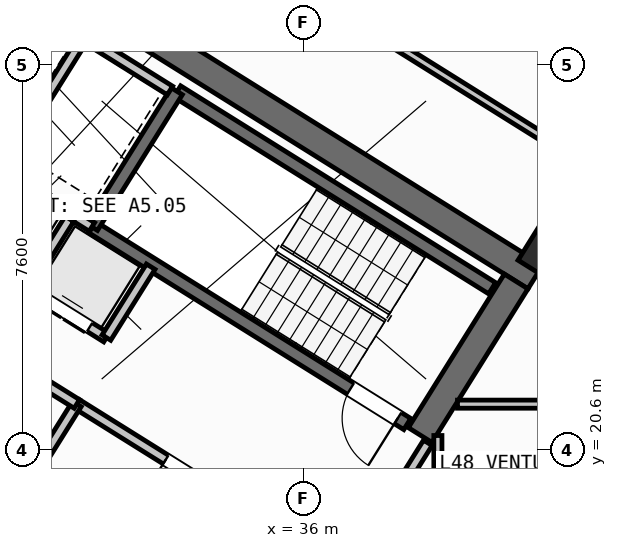
"""IFC4 building model, lengths in metres.
Left out: names, types, materials, properties, quantities, classifications, styles, units other than length and angle.
Written with IfcOpenShell. Run it as: python <this file> out.ifc"""

import sys

from ifc_helpers import new_model, si_unit, direction, frame, frame_2d, origin, origin_2d, place, context, subcontext, project, spatial, rectangle, hollow_rectangle, extrude, source, transform, mapped, element, fill, save


model = new_model("IFC4")
c1 = context("Model", 3, precision=1e-05, world=origin(), true_north=direction((0.0, 1.0)))
c2 = subcontext(c1, "Body", "Model", "MODEL_VIEW")
j1 = project(units=[si_unit("LENGTHUNIT", "METRE"), si_unit("PLANEANGLEUNIT", "RADIAN")], contexts=[c1])
p1 = place(None, origin())
s1 = spatial("IfcSite", under=j1, at=p1, CompositionType="ELEMENT")
p2 = place(p1, origin())
s2 = spatial("IfcBuilding", under=s1, at=p2, CompositionType="ELEMENT")
p3 = place(p2, frame((0.0, 0.0, 191.4)))
s3 = spatial("IfcBuildingStorey", under=s2, at=p3, CompositionType="ELEMENT", Elevation=191.4)
p4 = place(p3, frame((40.573, 24.01, 0.0), z_axis=(0.0, 0.0, 1.0), x_axis=(-0.848047359947, 0.529920442413, 0.0)))
e1 = element("IfcWall", 1, at=p4, inside=s3, PredefinedType="SHEAR", context=c2, shape_type="SweptSolid", body=[
    extrude(rectangle(XDim=13.14, YDim=0.55, at=frame_2d((6.57, 0.0))), origin(), (0.0, 0.0, 1.0), 3.32),
])
p5 = place(p3, frame((40.194, 23.922, 0.0), z_axis=(0.0, 0.0, 1.0), x_axis=(-0.529888438328, -0.848067357541, 0.0)))
e2 = element("IfcWall", 2, at=p5, inside=s3, PredefinedType="SHEAR", context=c2, shape_type="SweptSolid", body=[
    extrude(rectangle(XDim=3.575, YDim=0.55, at=frame_2d((1.788, 0.0))), origin(), (0.0, 0.0, 1.0), 3.32),
])
m1 = source(origin(), c2, "Body", "SweptSolid", [
    extrude(hollow_rectangle(XDim=0.8, YDim=0.8, WallThickness=0.032, at=origin_2d()), origin(), (0.0, 0.0, 1.0), 3.6),
])
p6 = place(p3, frame((40.783, 24.469, 0.0), z_axis=(0.0, 0.0, 1.0), x_axis=(-0.848048096156, 0.529919264233, 0.0)))
e3 = element("IfcColumn", 3, at=p6, inside=s3, PredefinedType="COLUMN", context=c2, shape_type="MappedRepresentation", body=[
    mapped(m1, transform((0.0, 0.0, 0.0), scale=1.0)),
])
p7 = place(p3, frame((31.76, 12.183, 0.0), z_axis=(0.0, 0.0, 1.0), x_axis=(-0.848047074256, 0.529920899612, 0.0)))
e4 = element("IfcWall", 4, at=p7, inside=s3, PredefinedType="STANDARD", context=c2, shape_type="SweptSolid", body=[
    extrude(rectangle(XDim=30.652, YDim=0.32, at=frame_2d((15.326, 0.0))), origin(), (0.0, 0.0, 1.0), 3.32),
])
p8 = place(p7, frame((15.166, 0.0, 0.0)))
e5 = element("IfcOpeningElement", 5, at=p8, cuts=e4, PredefinedType="OPENING", context=c2, shape_type="SweptSolid", body=[
    extrude(rectangle(XDim=1.2, YDim=2.15, at=frame_2d((0.6, 1.075))), frame((0.0, 0.17, 0.0), z_axis=(0.0, -1.0, 0.0), x_axis=(1.0, 0.0, 0.0)), (0.0, 0.0, 1.0), 0.34),
])
p9 = place(p7, frame((2.015, 0.0, 0.8)))
e6 = element("IfcOpeningElement", 6, at=p9, cuts=e4, PredefinedType="OPENING", context=c2, shape_type="SweptSolid", body=[
    extrude(rectangle(XDim=2.1, YDim=1.55, at=frame_2d((1.05, 0.775))), frame((0.0, 0.17, 0.0), z_axis=(0.0, -1.0, 0.0), x_axis=(1.0, 0.0, 0.0)), (0.0, 0.0, 1.0), 0.34),
])
p10 = place(p7, frame((7.244, 0.0, 0.8)))
e7 = element("IfcOpeningElement", 7, at=p10, cuts=e4, PredefinedType="OPENING", context=c2, shape_type="SweptSolid", body=[
    extrude(rectangle(XDim=2.1, YDim=1.55, at=frame_2d((1.05, 0.775))), frame((0.0, 0.17, 0.0), z_axis=(0.0, -1.0, 0.0), x_axis=(1.0, 0.0, 0.0)), (0.0, 0.0, 1.0), 0.34),
])
p11 = place(p7, frame((12.623, 0.0, 1.0)))
e8 = element("IfcOpeningElement", 8, at=p11, cuts=e4, PredefinedType="OPENING", context=c2, shape_type="SweptSolid", body=[
    extrude(rectangle(XDim=0.9, YDim=1.25, at=frame_2d((0.45, 0.625))), frame((0.0, 0.17, 0.0), z_axis=(0.0, -1.0, 0.0), x_axis=(1.0, 0.0, 0.0)), (0.0, 0.0, 1.0), 0.34),
])
p12 = place(p7, frame((19.565, 0.0, 0.95)))
e9 = element("IfcOpeningElement", 9, at=p12, cuts=e4, PredefinedType="OPENING", context=c2, shape_type="SweptSolid", body=[
    extrude(rectangle(XDim=1.2, YDim=1.4, at=frame_2d((0.6, 0.7))), frame((0.0, 0.17, 0.0), z_axis=(0.0, -1.0, 0.0), x_axis=(1.0, 0.0, 0.0)), (0.0, 0.0, 1.0), 0.34),
])
p13 = place(p7, frame((25.983, 0.0, 1.0)))
e10 = element("IfcOpeningElement", 10, at=p13, cuts=e4, PredefinedType="OPENING", context=c2, shape_type="SweptSolid", body=[
    extrude(rectangle(XDim=0.9, YDim=1.25, at=frame_2d((0.45, 0.625))), frame((0.0, 0.17, 0.0), z_axis=(0.0, -1.0, 0.0), x_axis=(1.0, 0.0, 0.0)), (0.0, 0.0, 1.0), 0.34),
])
p14 = place(p7, frame((28.433, 0.0, 1.0)))
e11 = element("IfcOpeningElement", 11, at=p14, cuts=e4, PredefinedType="OPENING", context=c2, shape_type="SweptSolid", body=[
    extrude(rectangle(XDim=0.9, YDim=1.25, at=frame_2d((0.45, 0.625))), frame((0.0, 0.17, 0.0), z_axis=(0.0, -1.0, 0.0), x_axis=(1.0, 0.0, 0.0)), (0.0, 0.0, 1.0), 0.34),
])
p15 = place(p3, frame((31.28, 18.261, 0.0), z_axis=(0.0, 0.0, 1.0), x_axis=(-0.848051618787, 0.529913626805, 0.0)))
e12 = element("IfcWall", 12, at=p15, inside=s3, PredefinedType="SHEAR", context=c2, shape_type="SweptSolid", body=[
    extrude(rectangle(XDim=7.46, YDim=0.26, at=frame_2d((3.73, 0.0))), origin(), (0.0, 0.0, 1.0), 3.32),
])
p16 = place(p15, frame((0.36, 0.0, 0.0)))
e13 = element("IfcOpeningElement", 13, at=p16, cuts=e12, PredefinedType="OPENING", context=c2, shape_type="SweptSolid", body=[
    extrude(rectangle(XDim=0.86, YDim=2.05, at=frame_2d((0.43, 1.025))), frame((0.0, 0.14, 0.0), z_axis=(0.0, -1.0, 0.0), x_axis=(1.0, 0.0, 0.0)), (0.0, 0.0, 1.0), 0.28),
])
p17 = place(p3, frame((39.721, 23.788, 0.0), z_axis=(0.0, 0.0, 1.0), x_axis=(-0.848054434086, 0.529909121291, 0.0)))
e14 = element("IfcWall", 14, at=p17, inside=s3, PredefinedType="SHEAR", context=c2, shape_type="SweptSolid", body=[
    extrude(rectangle(XDim=7.33, YDim=0.26, at=frame_2d((3.665, 0.0))), origin(), (0.0, 0.0, 1.0), 3.32),
])
p18 = place(p3, frame((38.046, 21.108, 0.0), z_axis=(0.0, 0.0, 1.0), x_axis=(-0.848054434086, 0.529909121291, 0.0)))
e15 = element("IfcWall", 15, at=p18, inside=s3, PredefinedType="SHEAR", context=c2, shape_type="SweptSolid", body=[
    extrude(rectangle(XDim=7.33, YDim=0.26, at=frame_2d((3.665, 0.0))), origin(), (0.0, 0.0, 1.0), 3.32),
])
p19 = place(p18, frame((0.22, 0.0, 0.0)))
e16 = element("IfcOpeningElement", 16, at=p19, cuts=e15, PredefinedType="OPENING", context=c2, shape_type="SweptSolid", body=[
    extrude(rectangle(XDim=1.1, YDim=2.1, at=frame_2d((0.55, 1.05))), frame((0.0, 0.14, 0.0), z_axis=(0.0, -1.0, 0.0), x_axis=(1.0, 0.0, 0.0)), (0.0, 0.0, 1.0), 0.28),
])
p20 = place(p3, frame((33.496, 27.677, 0.0), z_axis=(0.0, 0.0, 1.0), x_axis=(-0.529908658664, -0.84805472316, 0.0)))
e17 = element("IfcWall", 17, at=p20, inside=s3, PredefinedType="SHEAR", context=c2, shape_type="SweptSolid", body=[
    extrude(rectangle(XDim=3.16, YDim=0.26, at=frame_2d((1.58, 0.0))), origin(), (0.0, 0.0, 1.0), 3.32),
])
p21 = place(p3, frame((36.417, 18.447, 0.0), z_axis=(0.0, 0.0, 1.0), x_axis=(-0.848064879198, 0.529892404805, 0.0)))
e18 = element("IfcWall", 18, at=p21, inside=s3, PredefinedType="STANDARD", context=c2, shape_type="SweptSolid", body=[
    extrude(rectangle(XDim=5.768, YDim=0.2, at=frame_2d((2.884, 0.0))), origin(), (0.0, 0.0, 1.0), 3.31),
])
p22 = place(p21, frame((2.548, 0.0, 0.0)))
e19 = element("IfcOpeningElement", 19, at=p22, cuts=e18, PredefinedType="OPENING", context=c2, shape_type="SweptSolid", body=[
    extrude(rectangle(XDim=1.15, YDim=2.1, at=frame_2d((0.575, 1.05))), frame((0.0, 0.11, 0.0), z_axis=(0.0, -1.0, 0.0), x_axis=(1.0, 0.0, 0.0)), (0.0, 0.0, 1.0), 0.22),
])
p23 = place(p3, frame((31.822, 24.998, 0.0), z_axis=(0.0, 0.0, 1.0), x_axis=(-0.848036912365, 0.52993716162, 0.0)))
e20 = element("IfcWall", 20, at=p23, inside=s3, PredefinedType="STANDARD", context=c2, shape_type="SweptSolid", body=[
    extrude(rectangle(XDim=4.618, YDim=0.2, at=frame_2d((2.309, 0.0))), origin(), (0.0, 0.0, 1.0), 3.31),
])
p24 = place(p3, frame((32.108, 22.814, 0.0), z_axis=(0.0, 0.0, 1.0), x_axis=(-0.848042229521, 0.529928652696, 0.0)))
e21 = element("IfcWall", 21, at=p24, inside=s3, PredefinedType="STANDARD", context=c2, shape_type="SweptSolid", body=[
    extrude(rectangle(XDim=5.62, YDim=0.2, at=frame_2d((2.81, 0.0))), origin(), (0.0, 0.0, 1.0), 3.31),
])
p25 = place(p24, frame((0.39, 0.0, 0.0)))
e22 = element("IfcOpeningElement", 22, at=p25, cuts=e21, PredefinedType="OPENING", context=c2, shape_type="SweptSolid", body=[
    extrude(rectangle(XDim=1.1, YDim=2.15, at=frame_2d((0.55, 1.075))), frame((0.0, 0.11, 0.0), z_axis=(0.0, -1.0, 0.0), x_axis=(1.0, 0.0, 0.0)), (0.0, 0.0, 1.0), 0.22),
])
p26 = place(p24, frame((2.25, 0.0, 0.0)))
e23 = element("IfcOpeningElement", 23, at=p26, cuts=e21, PredefinedType="OPENING", context=c2, shape_type="SweptSolid", body=[
    extrude(rectangle(XDim=1.1, YDim=2.15, at=frame_2d((0.55, 1.075))), frame((0.0, 0.11, 0.0), z_axis=(0.0, -1.0, 0.0), x_axis=(1.0, 0.0, 0.0)), (0.0, 0.0, 1.0), 0.22),
])
p27 = place(p24, frame((4.11, 0.0, 0.0)))
e24 = element("IfcOpeningElement", 24, at=p27, cuts=e21, PredefinedType="OPENING", context=c2, shape_type="SweptSolid", body=[
    extrude(rectangle(XDim=1.1, YDim=2.15, at=frame_2d((0.55, 1.075))), frame((0.0, 0.11, 0.0), z_axis=(0.0, -1.0, 0.0), x_axis=(1.0, 0.0, 0.0)), (0.0, 0.0, 1.0), 0.22),
])
p28 = place(p3, frame((32.982, 24.213, 0.0), z_axis=(0.0, 0.0, 1.0), x_axis=(-0.529839334948, -0.84809803628, 0.0)))
e25 = element("IfcWall", 25, at=p28, inside=s3, PredefinedType="STANDARD", context=c2, shape_type="SweptSolid", body=[
    extrude(rectangle(XDim=1.65, YDim=0.2, at=frame_2d((0.825, 0.0))), origin(), (0.0, 0.0, 1.0), 3.31),
])
p29 = place(p3, frame((31.645, 28.716, 0.0), z_axis=(0.0, 0.0, 1.0), x_axis=(-0.52986693015, -0.848080795876, 0.0)))
e26 = element("IfcWall", 26, at=p29, inside=s3, PredefinedType="STANDARD", context=c2, shape_type="SweptSolid", body=[
    extrude(rectangle(XDim=2.66, YDim=0.2, at=frame_2d((1.33, 0.0))), origin(), (0.0, 0.0, 1.0), 3.31),
])
p30 = place(p3, frame((33.363, 27.69, 0.0), z_axis=(0.0, 0.0, 1.0), x_axis=(-0.848047090064, 0.529920874315, 0.0)))
e27 = element("IfcWall", 27, at=p30, inside=s3, PredefinedType="STANDARD", context=c2, shape_type="SweptSolid", body=[
    extrude(rectangle(XDim=4.498, YDim=0.2, at=frame_2d((2.249, 0.0))), origin(), (0.0, 0.0, 1.0), 3.31),
])
p31 = place(p3, frame((31.379, 25.156, 0.0), z_axis=(0.0, 0.0, 1.0), x_axis=(-0.529998940003, -0.847998304005, 0.0)))
e28 = element("IfcWall", 28, at=p31, inside=s3, PredefinedType="STANDARD", context=c2, shape_type="SweptSolid", body=[
    extrude(rectangle(XDim=1.58, YDim=0.2, at=frame_2d((0.79, 0.0))), origin(), (0.0, 0.0, 1.0), 3.31),
])
p32 = place(p3, frame((31.525, 21.504, 0.0), z_axis=(0.0, 0.0, 1.0), x_axis=(-0.529907497854, -0.848055448493, 0.0)))
e29 = element("IfcWall", 29, at=p32, inside=s3, PredefinedType="STANDARD", context=c2, shape_type="SweptSolid", body=[
    extrude(rectangle(XDim=2.88, YDim=0.2, at=frame_2d((1.44, 0.0))), origin(), (0.0, 0.0, 1.0), 3.31),
])
p33 = place(p3, frame((31.525, 21.504, 0.0), z_axis=(0.0, 0.0, 1.0), x_axis=(-0.848040211232, 0.529931882541, 0.0)))
e30 = element("IfcWall", 30, at=p33, inside=s3, PredefinedType="STANDARD", context=c2, shape_type="SweptSolid", body=[
    extrude(rectangle(XDim=6.218, YDim=0.2, at=frame_2d((3.109, 0.0))), origin(), (0.0, 0.0, 1.0), 3.31),
])
p34 = place(p33, frame((4.4, 0.0, 0.0)))
e31 = element("IfcOpeningElement", 31, at=p34, cuts=e30, PredefinedType="OPENING", context=c2, shape_type="SweptSolid", body=[
    extrude(rectangle(XDim=0.86, YDim=2.05, at=frame_2d((0.43, 1.025))), frame((0.0, 0.11, 0.0), z_axis=(0.0, -1.0, 0.0), x_axis=(1.0, 0.0, 0.0)), (0.0, 0.0, 1.0), 0.22),
])
p35 = place(p33, frame((1.45, 0.0, 0.0)))
e32 = element("IfcOpeningElement", 32, at=p35, cuts=e30, PredefinedType="OPENING", context=c2, shape_type="SweptSolid", body=[
    extrude(rectangle(XDim=0.86, YDim=2.05, at=frame_2d((0.43, 1.025))), frame((0.0, 0.11, 0.0), z_axis=(0.0, -1.0, 0.0), x_axis=(1.0, 0.0, 0.0)), (0.0, 0.0, 1.0), 0.22),
])
p36 = place(p3, frame((41.936, 26.012, 0.0), z_axis=(0.0, 0.0, 1.0), x_axis=(-0.848051154596, 0.529914369676, 0.0)))
e33 = element("IfcWall", 33, at=p36, inside=s3, PredefinedType="PARTITIONING", context=c2, shape_type="SweptSolid", body=[
    extrude(rectangle(XDim=15.57, YDim=0.16, at=frame_2d((7.785, 0.0))), origin(), (0.0, 0.0, 1.0), 3.31),
])
p37 = place(p36, frame((10.83, 0.0, 0.0)))
e34 = element("IfcOpeningElement", 34, at=p37, cuts=e33, PredefinedType="OPENING", context=c2, shape_type="SweptSolid", body=[
    extrude(rectangle(XDim=1.0, YDim=2.1, at=frame_2d((0.5, 1.05))), frame((0.0, 0.09, 0.0), z_axis=(0.0, -1.0, 0.0), x_axis=(1.0, 0.0, 0.0)), (0.0, 0.0, 1.0), 0.18),
])
p38 = place(p3, frame((38.451, 20.737, 0.0), z_axis=(0.0, 0.0, 1.0), x_axis=(-0.529924799939, -0.848044637038, 0.0)))
e35 = element("IfcWall", 35, at=p38, inside=s3, PredefinedType="STANDARD", context=c2, shape_type="SweptSolid", body=[
    extrude(rectangle(XDim=2.96, YDim=0.2, at=frame_2d((1.48, 0.0))), origin(), (0.0, 0.0, 1.0), 3.31),
])
p39 = place(p38, frame((1.46, 0.0, 0.0)))
e36 = element("IfcOpeningElement", 36, at=p39, cuts=e35, PredefinedType="OPENING", context=c2, shape_type="SweptSolid", body=[
    extrude(rectangle(XDim=0.86, YDim=2.05, at=frame_2d((0.43, 1.025))), frame((0.0, 0.11, 0.0), z_axis=(0.0, -1.0, 0.0), x_axis=(1.0, 0.0, 0.0)), (0.0, 0.0, 1.0), 0.22),
])
p40 = place(p3, frame((38.65, 17.93, 0.0), z_axis=(0.0, 0.0, 1.0), x_axis=(0.0, 1.0, 0.0)))
e37 = element("IfcWall", 37, at=p40, inside=s3, PredefinedType="PARTITIONING", context=c2, shape_type="SweptSolid", body=[
    extrude(rectangle(XDim=2.951, YDim=0.16, at=frame_2d((1.476, 0.0))), origin(), (0.0, 0.0, 1.0), 3.31),
])
p41 = place(p3, frame((39.037, 21.5, 0.0), z_axis=(0.0, 0.0, 1.0), x_axis=(1.0, 0.0, 0.0)))
e38 = element("IfcWall", 38, at=p41, inside=s3, PredefinedType="PARTITIONING", context=c2, shape_type="SweptSolid", body=[
    extrude(rectangle(XDim=7.215, YDim=0.16, at=frame_2d((3.607, 0.0))), origin(), (0.0, 0.0, 1.0), 3.31),
])
m2 = source(origin(), c2, "Body", "SweptSolid", [
    extrude(rectangle(XDim=1.1, YDim=2.1, at=frame_2d((0.55, 1.05))), frame((0.0, 0.025, 0.0), z_axis=(0.0, -1.0, 0.0), x_axis=(1.0, 0.0, 0.0)), (0.0, 0.0, 1.0), 0.05),
])
p42 = place(p19, origin())
e39 = element("IfcDoor", 39, at=p42, inside=s3, OperationType="SINGLE_SWING_LEFT", PredefinedType="DOOR", context=c2, shape_type="MappedRepresentation", body=[
    mapped(m2, transform((0.0, 0.0, 0.0), scale=1.0)),
])
fill(e16, e39)
m3 = source(origin(), c2, "Body", "SweptSolid", [
    extrude(rectangle(XDim=1.15, YDim=2.1, at=frame_2d((0.575, 1.05))), frame((0.0, 0.025, 0.0), z_axis=(0.0, -1.0, 0.0), x_axis=(1.0, 0.0, 0.0)), (0.0, 0.0, 1.0), 0.05),
])
p43 = place(p22, origin())
e40 = element("IfcDoor", 40, at=p43, inside=s3, OperationType="SINGLE_SWING_RIGHT", PredefinedType="DOOR", context=c2, shape_type="MappedRepresentation", body=[
    mapped(m3, transform((0.0, 0.0, 0.0), scale=1.0)),
])
fill(e19, e40)
m4 = source(origin(), c2, "Body", "SweptSolid", [
    extrude(rectangle(XDim=1.1, YDim=2.15, at=frame_2d((0.55, 1.075))), frame((0.0, 0.025, 0.0), z_axis=(0.0, -1.0, 0.0), x_axis=(1.0, 0.0, 0.0)), (0.0, 0.0, 1.0), 0.05),
])
p44 = place(p25, origin())
e41 = element("IfcDoor", 41, at=p44, inside=s3, OperationType="DOUBLE_DOOR_SLIDING", PredefinedType="DOOR", context=c2, shape_type="MappedRepresentation", body=[
    mapped(m4, transform((0.0, 0.0, 0.0), scale=1.0)),
])
fill(e22, e41)
save(model, sys.argv[1])
